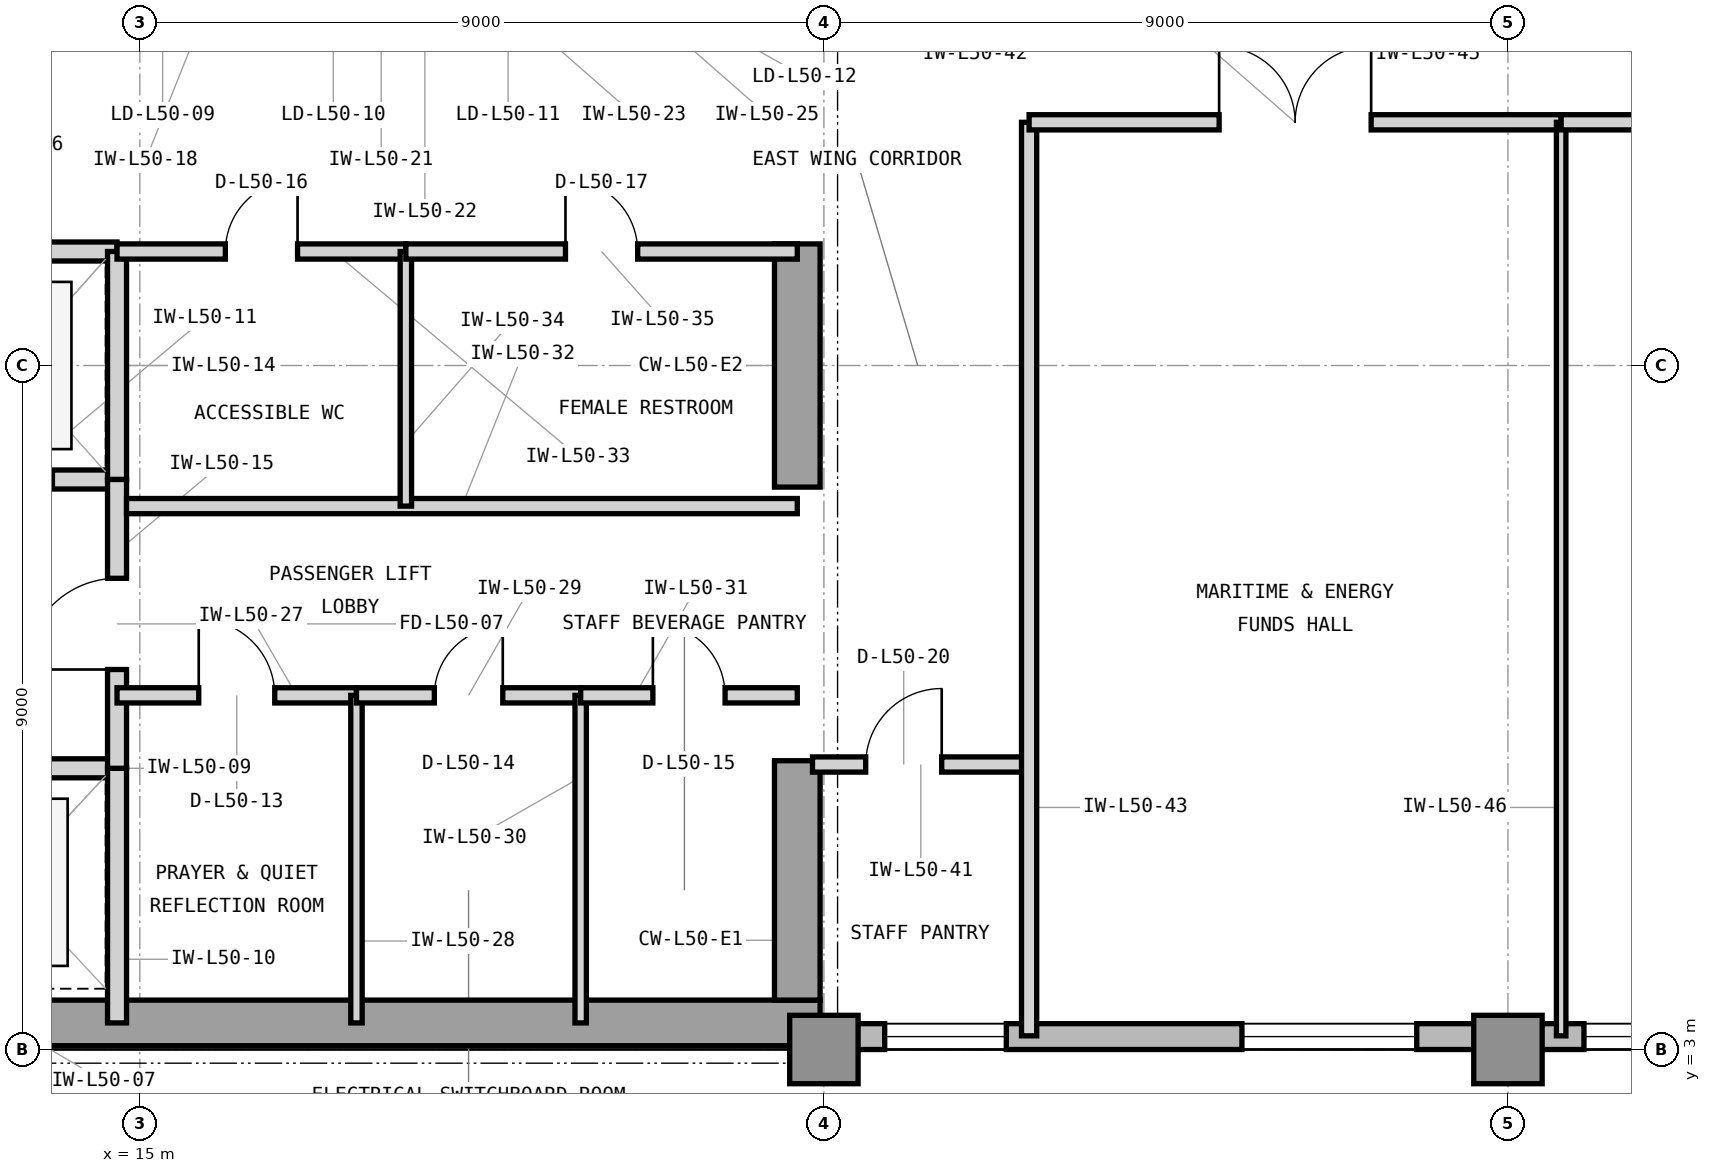
"""IFC4 building model, lengths in metres.
Left out: names, types, materials, properties, quantities, classifications, styles, units other than length and angle.
Written with IfcOpenShell. Run it as: python <this file> out.ifc"""

import sys

from ifc_helpers import new_model, si_unit, direction, frame, frame_2d, origin, origin_2d, place, context, subcontext, project, spatial, rectangle, extrude, element, fill, save


model = new_model("IFC4")
c1 = context("Model", 3, precision=1e-05, world=origin(), true_north=direction((0.0, 1.0)))
c2 = subcontext(c1, "Body", "Model", "MODEL_VIEW")
j1 = project(units=[si_unit("LENGTHUNIT", "METRE"), si_unit("PLANEANGLEUNIT", "RADIAN")], contexts=[c1])
p1 = place(None, origin())
s1 = spatial("IfcSite", under=j1, at=p1, CompositionType="ELEMENT")
p2 = place(p1, origin())
s2 = spatial("IfcBuilding", under=s1, at=p2, CompositionType="ELEMENT")
p3 = place(p2, frame((0.0, 0.0, 207.3)))
s3 = spatial("IfcBuildingStorey", under=s2, at=p3, CompositionType="ELEMENT", Elevation=207.3)
p4 = place(p3, frame((7.475, 3.35, 0.0), z_axis=(0.0, 0.0, 1.0), x_axis=(1.0, 0.0, 0.0)))
e1 = element("IfcWall", 1, at=p4, inside=s3, PredefinedType="SHEAR", context=c2, shape_type="SweptSolid", body=[
    extrude(rectangle(XDim=16.475, YDim=0.6, at=frame_2d((8.237, 0.0))), origin(), (0.0, 0.0, 1.0), 3.9),
])
p5 = place(p3, frame((23.65, 3.65, 0.0), z_axis=(0.0, 0.0, 1.0), x_axis=(0.0, 1.0, 0.0)))
e2 = element("IfcWall", 2, at=p5, inside=s3, PredefinedType="SHEAR", context=c2, shape_type="SweptSolid", body=[
    extrude(rectangle(XDim=3.15, YDim=0.6, at=frame_2d((1.575, 0.0))), origin(), (0.0, 0.0, 1.0), 3.9),
])
p6 = place(p3, frame((23.65, 10.4, 0.0), z_axis=(0.0, 0.0, 1.0), x_axis=(0.0, 1.0, 0.0)))
e3 = element("IfcWall", 3, at=p6, inside=s3, PredefinedType="SHEAR", context=c2, shape_type="SweptSolid", body=[
    extrude(rectangle(XDim=3.2, YDim=0.6, at=frame_2d((1.6, 0.0))), origin(), (0.0, 0.0, 1.0), 3.9),
])
for number, where, z_axis, x_axis in (
    (4, (24.0, 3.0, 0.0), (0.0, 0.0, 1.0), (1.0, 0.0, 0.0)),
    (5, (33.0, 3.0, 0.0), (0.0, 0.0, 1.0), (1.0, 0.0, 0.0)),
):
    element("IfcColumn", number, at=place(p3, frame(where, z_axis=z_axis, x_axis=x_axis)), inside=s3, PredefinedType="COLUMN", context=c2, shape_type="SweptSolid", body=[
        extrude(rectangle(XDim=0.9, YDim=0.9, at=origin_2d()), origin(), (0.0, 0.0, 1.0), 3.9),
    ])
p7 = place(p3, frame((23.9, 3.17, 0.0), z_axis=(0.0, 0.0, 1.0), x_axis=(1.0, 0.0, 0.0)))
e6 = element("IfcWall", 6, at=p7, inside=s3, PredefinedType="STANDARD", context=c2, shape_type="SweptSolid", body=[
    extrude(rectangle(XDim=31.5, YDim=0.34, at=frame_2d((15.75, 0.0))), origin(), (0.0, 0.0, 1.0), 3.7),
])
p8 = place(p7, frame((5.6, 0.0, 0.9)))
e7 = element("IfcOpeningElement", 7, at=p8, cuts=e6, PredefinedType="OPENING", context=c2, shape_type="SweptSolid", body=[
    extrude(rectangle(XDim=2.3, YDim=2.2, at=frame_2d((1.15, 1.1))), frame((0.0, 0.18, 0.0), z_axis=(0.0, -1.0, 0.0), x_axis=(1.0, 0.0, 0.0)), (0.0, 0.0, 1.0), 0.36),
])
p9 = place(p7, frame((10.1, 0.0, 0.9)))
e8 = element("IfcOpeningElement", 8, at=p9, cuts=e6, PredefinedType="OPENING", context=c2, shape_type="SweptSolid", body=[
    extrude(rectangle(XDim=2.3, YDim=2.2, at=frame_2d((1.15, 1.1))), frame((0.0, 0.18, 0.0), z_axis=(0.0, -1.0, 0.0), x_axis=(1.0, 0.0, 0.0)), (0.0, 0.0, 1.0), 0.36),
])
p10 = place(p7, frame((19.1, 0.0, 0.9)))
e9 = element("IfcOpeningElement", 9, at=p10, cuts=e6, PredefinedType="OPENING", context=c2, shape_type="SweptSolid", body=[
    extrude(rectangle(XDim=2.3, YDim=2.2, at=frame_2d((1.15, 1.1))), frame((0.0, 0.18, 0.0), z_axis=(0.0, -1.0, 0.0), x_axis=(1.0, 0.0, 0.0)), (0.0, 0.0, 1.0), 0.36),
])
p11 = place(p7, frame((0.9, 0.0, 0.9)))
e10 = element("IfcOpeningElement", 10, at=p11, cuts=e6, PredefinedType="OPENING", context=c2, shape_type="SweptSolid", body=[
    extrude(rectangle(XDim=1.6, YDim=2.2, at=frame_2d((0.8, 1.1))), frame((0.0, 0.18, 0.0), z_axis=(0.0, -1.0, 0.0), x_axis=(1.0, 0.0, 0.0)), (0.0, 0.0, 1.0), 0.36),
])
p12 = place(p3, frame((11.82, 6.7, 0.0), z_axis=(0.0, 0.0, 1.0), x_axis=(1.0, 0.0, 0.0)))
e11 = element("IfcWall", 11, at=p12, inside=s3, PredefinedType="PARTITIONING", context=c2, shape_type="SweptSolid", body=[
    extrude(rectangle(XDim=2.88, YDim=0.25, at=frame_2d((1.44, 0.0))), origin(), (0.0, 0.0, 1.0), 3.283),
])
p13 = place(p12, frame((0.85, 0.0, 0.0)))
e12 = element("IfcOpeningElement", 12, at=p13, cuts=e11, PredefinedType="OPENING", context=c2, shape_type="SweptSolid", body=[
    extrude(rectangle(XDim=1.1, YDim=2.25, at=frame_2d((0.55, 1.125))), frame((0.0, 0.135, 0.0), z_axis=(0.0, -1.0, 0.0), x_axis=(1.0, 0.0, 0.0)), (0.0, 0.0, 1.0), 0.27),
])
p14 = place(p3, frame((14.7, 3.35, 0.0), z_axis=(0.0, 0.0, 1.0), x_axis=(0.0, 1.0, 0.0)))
e13 = element("IfcWall", 13, at=p14, inside=s3, PredefinedType="PARTITIONING", context=c2, shape_type="SweptSolid", body=[
    extrude(rectangle(XDim=3.35, YDim=0.25, at=frame_2d((1.675, 0.0))), origin(), (0.0, 0.0, 1.0), 3.69),
])
p15 = place(p3, frame((11.95, 10.5, 0.0), z_axis=(0.0, 0.0, 1.0), x_axis=(1.0, 0.0, 0.0)))
e14 = element("IfcWall", 14, at=p15, inside=s3, PredefinedType="PARTITIONING", context=c2, shape_type="SweptSolid", body=[
    extrude(rectangle(XDim=2.75, YDim=0.25, at=frame_2d((1.375, 0.0))), origin(), (0.0, 0.0, 1.0), 3.283),
])
p16 = place(p15, frame((0.8, 0.0, 0.0)))
e15 = element("IfcOpeningElement", 15, at=p16, cuts=e14, PredefinedType="OPENING", context=c2, shape_type="SweptSolid", body=[
    extrude(rectangle(XDim=1.1, YDim=2.25, at=frame_2d((0.55, 1.125))), frame((0.0, 0.135, 0.0), z_axis=(0.0, -1.0, 0.0), x_axis=(1.0, 0.0, 0.0)), (0.0, 0.0, 1.0), 0.27),
])
p17 = place(p3, frame((11.95, 13.5, 0.0), z_axis=(0.0, 0.0, 1.0), x_axis=(1.0, 0.0, 0.0)))
e16 = element("IfcWall", 16, at=p17, inside=s3, PredefinedType="PARTITIONING", context=c2, shape_type="SweptSolid", body=[
    extrude(rectangle(XDim=2.75, YDim=0.25, at=frame_2d((1.375, 0.0))), origin(), (0.0, 0.0, 1.0), 3.283),
])
p18 = place(p3, frame((14.7, 10.5, 0.0), z_axis=(0.0, 0.0, 1.0), x_axis=(0.0, 1.0, 0.0)))
e17 = element("IfcWall", 17, at=p18, inside=s3, PredefinedType="PARTITIONING", context=c2, shape_type="SweptSolid", body=[
    extrude(rectangle(XDim=3.0, YDim=0.25, at=frame_2d((1.5, 0.0))), origin(), (0.0, 0.0, 1.0), 3.69),
])
p19 = place(p3, frame((14.7, 6.7, 0.0), z_axis=(0.0, 0.0, 1.0), x_axis=(0.0, 1.0, 0.0)))
e18 = element("IfcWall", 18, at=p19, inside=s3, PredefinedType="PARTITIONING", context=c2, shape_type="SweptSolid", body=[
    extrude(rectangle(XDim=3.8, YDim=0.25, at=frame_2d((1.9, 0.0))), origin(), (0.0, 0.0, 1.0), 3.69),
])
p20 = place(p19, frame((1.3, 0.0, 0.0)))
e19 = element("IfcOpeningElement", 19, at=p20, cuts=e18, PredefinedType="OPENING", context=c2, shape_type="SweptSolid", body=[
    extrude(rectangle(XDim=1.2, YDim=2.2, at=frame_2d((0.6, 1.1))), frame((0.0, 0.135, 0.0), z_axis=(0.0, -1.0, 0.0), x_axis=(1.0, 0.0, 0.0)), (0.0, 0.0, 1.0), 0.27),
])
p21 = place(p3, frame((14.7, 7.66, 0.0), z_axis=(0.0, 0.0, 1.0), x_axis=(1.0, 0.0, 0.0)))
e20 = element("IfcWall", 20, at=p21, inside=s3, PredefinedType="PARTITIONING", context=c2, shape_type="SweptSolid", body=[
    extrude(rectangle(XDim=3.15, YDim=0.2, at=frame_2d((1.575, 0.0))), origin(), (0.0, 0.0, 1.0), 3.69),
])
p22 = place(p21, frame((1.075, 0.0, 0.0)))
e21 = element("IfcOpeningElement", 21, at=p22, cuts=e20, PredefinedType="OPENING", context=c2, shape_type="SweptSolid", body=[
    extrude(rectangle(XDim=1.0, YDim=2.15, at=frame_2d((0.5, 1.075))), frame((0.0, 0.11, 0.0), z_axis=(0.0, -1.0, 0.0), x_axis=(1.0, 0.0, 0.0)), (0.0, 0.0, 1.0), 0.22),
])
p23 = place(p3, frame((17.85, 3.35, 0.0), z_axis=(0.0, 0.0, 1.0), x_axis=(0.0, 1.0, 0.0)))
e22 = element("IfcWall", 22, at=p23, inside=s3, PredefinedType="PARTITIONING", context=c2, shape_type="SweptSolid", body=[
    extrude(rectangle(XDim=4.31, YDim=0.15, at=frame_2d((2.155, 0.0))), origin(), (0.0, 0.0, 1.0), 3.69),
])
p24 = place(p3, frame((17.85, 7.66, 0.0), z_axis=(0.0, 0.0, 1.0), x_axis=(1.0, 0.0, 0.0)))
e23 = element("IfcWall", 23, at=p24, inside=s3, PredefinedType="PARTITIONING", context=c2, shape_type="SweptSolid", body=[
    extrude(rectangle(XDim=2.95, YDim=0.2, at=frame_2d((1.475, 0.0))), origin(), (0.0, 0.0, 1.0), 3.69),
])
p25 = place(p24, frame((1.025, 0.0, 0.0)))
e24 = element("IfcOpeningElement", 24, at=p25, cuts=e23, PredefinedType="OPENING", context=c2, shape_type="SweptSolid", body=[
    extrude(rectangle(XDim=0.9, YDim=2.1, at=frame_2d((0.45, 1.05))), frame((0.0, 0.11, 0.0), z_axis=(0.0, -1.0, 0.0), x_axis=(1.0, 0.0, 0.0)), (0.0, 0.0, 1.0), 0.22),
])
p26 = place(p3, frame((20.8, 3.35, 0.0), z_axis=(0.0, 0.0, 1.0), x_axis=(0.0, 1.0, 0.0)))
e25 = element("IfcWall", 25, at=p26, inside=s3, PredefinedType="PARTITIONING", context=c2, shape_type="SweptSolid", body=[
    extrude(rectangle(XDim=4.31, YDim=0.15, at=frame_2d((2.155, 0.0))), origin(), (0.0, 0.0, 1.0), 3.69),
])
p27 = place(p3, frame((20.8, 7.66, 0.0), z_axis=(0.0, 0.0, 1.0), x_axis=(1.0, 0.0, 0.0)))
e26 = element("IfcWall", 26, at=p27, inside=s3, PredefinedType="PARTITIONING", context=c2, shape_type="SweptSolid", body=[
    extrude(rectangle(XDim=2.85, YDim=0.2, at=frame_2d((1.425, 0.0))), origin(), (0.0, 0.0, 1.0), 3.69),
])
p28 = place(p27, frame((0.95, 0.0, 0.0)))
e27 = element("IfcOpeningElement", 27, at=p28, cuts=e26, PredefinedType="OPENING", context=c2, shape_type="SweptSolid", body=[
    extrude(rectangle(XDim=0.95, YDim=2.1, at=frame_2d((0.475, 1.05))), frame((0.0, 0.11, 0.0), z_axis=(0.0, -1.0, 0.0), x_axis=(1.0, 0.0, 0.0)), (0.0, 0.0, 1.0), 0.22),
])
p29 = place(p3, frame((14.825, 10.15, 0.0), z_axis=(0.0, 0.0, 1.0), x_axis=(1.0, 0.0, 0.0)))
e28 = element("IfcWall", 28, at=p29, inside=s3, PredefinedType="PARTITIONING", context=c2, shape_type="SweptSolid", body=[
    extrude(rectangle(XDim=8.825, YDim=0.2, at=frame_2d((4.413, 0.0))), origin(), (0.0, 0.0, 1.0), 3.69),
])
p30 = place(p3, frame((14.7, 13.5, 0.0), z_axis=(0.0, 0.0, 1.0), x_axis=(1.0, 0.0, 0.0)))
e29 = element("IfcWall", 29, at=p30, inside=s3, PredefinedType="PARTITIONING", context=c2, shape_type="SweptSolid", body=[
    extrude(rectangle(XDim=3.8, YDim=0.2, at=frame_2d((1.9, 0.0))), origin(), (0.0, 0.0, 1.0), 3.283),
])
p31 = place(p30, frame((1.425, 0.0, 0.0)))
e30 = element("IfcOpeningElement", 30, at=p31, cuts=e29, PredefinedType="OPENING", context=c2, shape_type="SweptSolid", body=[
    extrude(rectangle(XDim=0.95, YDim=2.1, at=frame_2d((0.475, 1.05))), frame((0.0, 0.11, 0.0), z_axis=(0.0, -1.0, 0.0), x_axis=(1.0, 0.0, 0.0)), (0.0, 0.0, 1.0), 0.22),
])
p32 = place(p3, frame((18.5, 10.15, 0.0), z_axis=(0.0, 0.0, 1.0), x_axis=(0.0, 1.0, 0.0)))
e31 = element("IfcWall", 31, at=p32, inside=s3, PredefinedType="PARTITIONING", context=c2, shape_type="SweptSolid", body=[
    extrude(rectangle(XDim=3.35, YDim=0.15, at=frame_2d((1.675, 0.0))), origin(), (0.0, 0.0, 1.0), 3.69),
])
p33 = place(p3, frame((18.5, 13.5, 0.0), z_axis=(0.0, 0.0, 1.0), x_axis=(1.0, 0.0, 0.0)))
e32 = element("IfcWall", 32, at=p33, inside=s3, PredefinedType="PARTITIONING", context=c2, shape_type="SweptSolid", body=[
    extrude(rectangle(XDim=5.15, YDim=0.2, at=frame_2d((2.575, 0.0))), origin(), (0.0, 0.0, 1.0), 3.283),
])
p34 = place(p33, frame((2.1, 0.0, 0.0)))
e33 = element("IfcOpeningElement", 33, at=p34, cuts=e32, PredefinedType="OPENING", context=c2, shape_type="SweptSolid", body=[
    extrude(rectangle(XDim=0.95, YDim=2.1, at=frame_2d((0.475, 1.05))), frame((0.0, 0.11, 0.0), z_axis=(0.0, -1.0, 0.0), x_axis=(1.0, 0.0, 0.0)), (0.0, 0.0, 1.0), 0.22),
])
p35 = place(p3, frame((23.85, 6.75, 0.0), z_axis=(0.0, 0.0, 1.0), x_axis=(1.0, 0.0, 0.0)))
e34 = element("IfcWall", 34, at=p35, inside=s3, PredefinedType="PARTITIONING", context=c2, shape_type="SweptSolid", body=[
    extrude(rectangle(XDim=2.85, YDim=0.2, at=frame_2d((1.425, 0.0))), origin(), (0.0, 0.0, 1.0), 3.69),
])
p36 = place(p35, frame((0.7, 0.0, 0.0)))
e35 = element("IfcOpeningElement", 35, at=p36, cuts=e34, PredefinedType="OPENING", context=c2, shape_type="SweptSolid", body=[
    extrude(rectangle(XDim=1.0, YDim=2.15, at=frame_2d((0.5, 1.075))), frame((0.0, 0.11, 0.0), z_axis=(0.0, -1.0, 0.0), x_axis=(1.0, 0.0, 0.0)), (0.0, 0.0, 1.0), 0.22),
])
p37 = place(p3, frame((26.7, 3.18, 0.0), z_axis=(0.0, 0.0, 1.0), x_axis=(0.0, 1.0, 0.0)))
e36 = element("IfcWall", 36, at=p37, inside=s3, PredefinedType="PARTITIONING", context=c2, shape_type="SweptSolid", body=[
    extrude(rectangle(XDim=12.02, YDim=0.2, at=frame_2d((6.01, 0.0))), origin(), (0.0, 0.0, 1.0), 3.69),
])
p38 = place(p3, frame((26.7, 15.2, 0.0), z_axis=(0.0, 0.0, 1.0), x_axis=(1.0, 0.0, 0.0)))
e37 = element("IfcWall", 37, at=p38, inside=s3, PredefinedType="PARTITIONING", context=c2, shape_type="SweptSolid", body=[
    extrude(rectangle(XDim=7.0, YDim=0.2, at=frame_2d((3.5, 0.0))), origin(), (0.0, 0.0, 1.0), 3.69),
])
p39 = place(p38, frame((2.5, 0.0, 0.0)))
e38 = element("IfcOpeningElement", 38, at=p39, cuts=e37, PredefinedType="OPENING", context=c2, shape_type="SweptSolid", body=[
    extrude(rectangle(XDim=2.0, YDim=2.5, at=frame_2d((1.0, 1.25))), frame((0.0, 0.11, 0.0), z_axis=(0.0, -1.0, 0.0), x_axis=(1.0, 0.0, 0.0)), (0.0, 0.0, 1.0), 0.22),
])
p40 = place(p3, frame((33.7, 3.18, 0.0), z_axis=(0.0, 0.0, 1.0), x_axis=(0.0, 1.0, 0.0)))
e39 = element("IfcWall", 39, at=p40, inside=s3, PredefinedType="PARTITIONING", context=c2, shape_type="SweptSolid", body=[
    extrude(rectangle(XDim=12.02, YDim=0.125, at=frame_2d((6.01, 0.0))), origin(), (0.0, 0.0, 1.0), 3.69),
])
p41 = place(p3, frame((33.7, 15.2, 0.0), z_axis=(0.0, 0.0, 1.0), x_axis=(1.0, 0.0, 0.0)))
e40 = element("IfcWall", 40, at=p41, inside=s3, PredefinedType="PARTITIONING", context=c2, shape_type="SweptSolid", body=[
    extrude(rectangle(XDim=7.0, YDim=0.2, at=frame_2d((3.5, 0.0))), origin(), (0.0, 0.0, 1.0), 3.69),
])
p42 = place(p41, frame((3.0, 0.0, 0.0)))
e41 = element("IfcOpeningElement", 41, at=p42, cuts=e40, PredefinedType="OPENING", context=c2, shape_type="SweptSolid", body=[
    extrude(rectangle(XDim=1.0, YDim=2.15, at=frame_2d((0.5, 1.075))), frame((0.0, 0.11, 0.0), z_axis=(0.0, -1.0, 0.0), x_axis=(1.0, 0.0, 0.0)), (0.0, 0.0, 1.0), 0.22),
])
p43 = place(p8, origin())
e42 = element("IfcWindow", 42, at=p43, inside=s3, PartitioningType="SINGLE_PANEL", PredefinedType="WINDOW", context=c2, shape_type="SweptSolid", body=[
    extrude(rectangle(XDim=2.3, YDim=2.2, at=frame_2d((1.15, 1.1))), frame((0.0, 0.11, 0.0), z_axis=(0.0, -1.0, 0.0), x_axis=(1.0, 0.0, 0.0)), (0.0, 0.0, 1.0), 0.06),
])
fill(e7, e42)
p44 = place(p9, origin())
e43 = element("IfcWindow", 43, at=p44, inside=s3, PartitioningType="SINGLE_PANEL", PredefinedType="WINDOW", context=c2, shape_type="SweptSolid", body=[
    extrude(rectangle(XDim=2.3, YDim=2.2, at=frame_2d((1.15, 1.1))), frame((0.0, 0.11, 0.0), z_axis=(0.0, -1.0, 0.0), x_axis=(1.0, 0.0, 0.0)), (0.0, 0.0, 1.0), 0.06),
])
fill(e8, e43)
p45 = place(p20, origin())
e44 = element("IfcDoor", 44, at=p45, inside=s3, OperationType="SINGLE_SWING_LEFT", PredefinedType="DOOR", context=c2, shape_type="SweptSolid", body=[
    extrude(rectangle(XDim=1.2, YDim=2.2, at=frame_2d((0.6, 1.1))), frame((0.0, 0.025, 0.0), z_axis=(0.0, -1.0, 0.0), x_axis=(1.0, 0.0, 0.0)), (0.0, 0.0, 1.0), 0.05),
])
fill(e19, e44)
p46 = place(p22, origin())
e45 = element("IfcDoor", 45, at=p46, inside=s3, OperationType="SINGLE_SWING_LEFT", PredefinedType="DOOR", context=c2, shape_type="SweptSolid", body=[
    extrude(rectangle(XDim=1.0, YDim=2.15, at=frame_2d((0.5, 1.075))), frame((0.0, 0.025, 0.0), z_axis=(0.0, -1.0, 0.0), x_axis=(1.0, 0.0, 0.0)), (0.0, 0.0, 1.0), 0.05),
])
fill(e21, e45)
p47 = place(p25, origin())
e46 = element("IfcDoor", 46, at=p47, inside=s3, OperationType="SINGLE_SWING_RIGHT", PredefinedType="TRAPDOOR", context=c2, shape_type="SweptSolid", body=[
    extrude(rectangle(XDim=0.9, YDim=2.1, at=frame_2d((0.45, 1.05))), frame((0.0, 0.025, 0.0), z_axis=(0.0, -1.0, 0.0), x_axis=(1.0, 0.0, 0.0)), (0.0, 0.0, 1.0), 0.05),
])
fill(e24, e46)
p48 = place(p28, origin())
e47 = element("IfcDoor", 47, at=p48, inside=s3, OperationType="SINGLE_SWING_LEFT", PredefinedType="DOOR", context=c2, shape_type="SweptSolid", body=[
    extrude(rectangle(XDim=0.95, YDim=2.1, at=frame_2d((0.475, 1.05))), frame((0.0, 0.025, 0.0), z_axis=(0.0, -1.0, 0.0), x_axis=(1.0, 0.0, 0.0)), (0.0, 0.0, 1.0), 0.05),
])
fill(e27, e47)
p49 = place(p31, origin())
e48 = element("IfcDoor", 48, at=p49, inside=s3, OperationType="SINGLE_SWING_RIGHT", PredefinedType="DOOR", context=c2, shape_type="SweptSolid", body=[
    extrude(rectangle(XDim=0.95, YDim=2.1, at=frame_2d((0.475, 1.05))), frame((0.0, 0.025, 0.0), z_axis=(0.0, -1.0, 0.0), x_axis=(1.0, 0.0, 0.0)), (0.0, 0.0, 1.0), 0.05),
])
fill(e30, e48)
p50 = place(p34, origin())
e49 = element("IfcDoor", 49, at=p50, inside=s3, OperationType="SINGLE_SWING_LEFT", PredefinedType="DOOR", context=c2, shape_type="SweptSolid", body=[
    extrude(rectangle(XDim=0.95, YDim=2.1, at=frame_2d((0.475, 1.05))), frame((0.0, 0.025, 0.0), z_axis=(0.0, -1.0, 0.0), x_axis=(1.0, 0.0, 0.0)), (0.0, 0.0, 1.0), 0.05),
])
fill(e33, e49)
p51 = place(p36, origin())
e50 = element("IfcDoor", 50, at=p51, inside=s3, OperationType="SINGLE_SWING_RIGHT", PredefinedType="DOOR", context=c2, shape_type="SweptSolid", body=[
    extrude(rectangle(XDim=1.0, YDim=2.15, at=frame_2d((0.5, 1.075))), frame((0.0, 0.025, 0.0), z_axis=(0.0, -1.0, 0.0), x_axis=(1.0, 0.0, 0.0)), (0.0, 0.0, 1.0), 0.05),
])
fill(e35, e50)
p52 = place(p39, origin())
e51 = element("IfcDoor", 51, at=p52, inside=s3, OperationType="DOUBLE_DOOR_SINGLE_SWING", PredefinedType="DOOR", context=c2, shape_type="SweptSolid", body=[
    extrude(rectangle(XDim=2.0, YDim=2.5, at=frame_2d((1.0, 1.25))), frame((0.0, 0.025, 0.0), z_axis=(0.0, -1.0, 0.0), x_axis=(1.0, 0.0, 0.0)), (0.0, 0.0, 1.0), 0.05),
])
fill(e38, e51)
p53 = place(p11, origin())
e52 = element("IfcWindow", 52, at=p53, inside=s3, PartitioningType="SINGLE_PANEL", PredefinedType="WINDOW", context=c2, shape_type="SweptSolid", body=[
    extrude(rectangle(XDim=1.6, YDim=2.2, at=frame_2d((0.8, 1.1))), frame((0.0, 0.11, 0.0), z_axis=(0.0, -1.0, 0.0), x_axis=(1.0, 0.0, 0.0)), (0.0, 0.0, 1.0), 0.06),
])
fill(e10, e52)
save(model, sys.argv[1])
